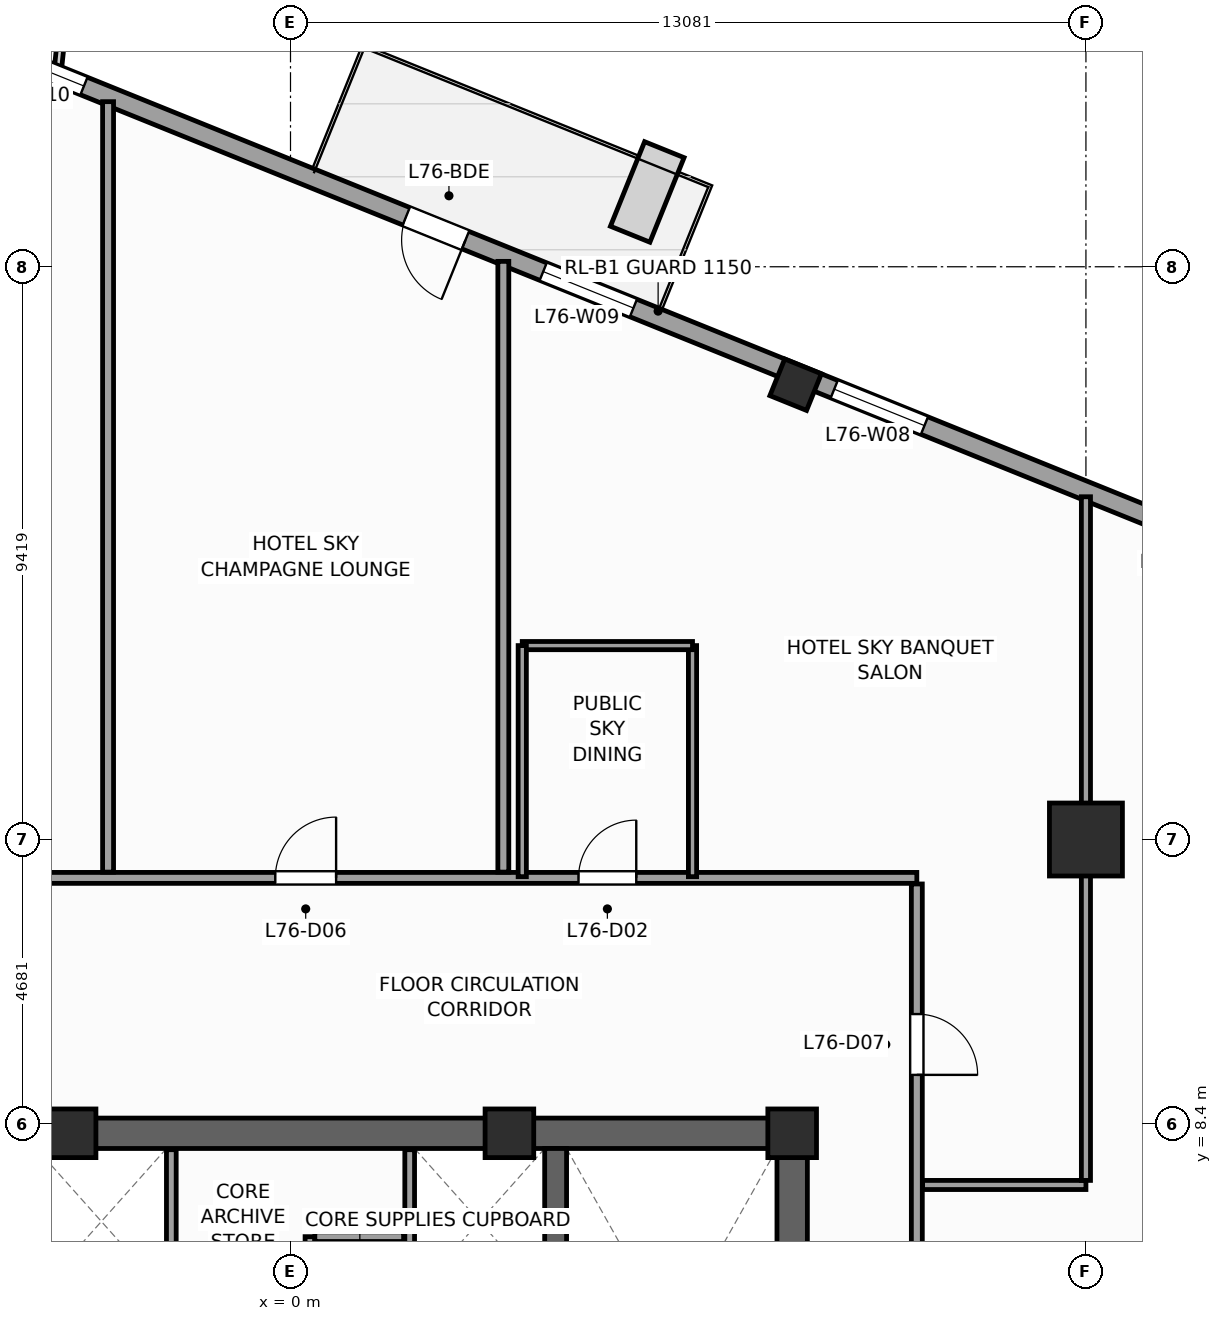
"""IFC4 building model, lengths in metres.
Left out: names, types, materials, properties, quantities, classifications, styles, units other than length and angle.
Written with IfcOpenShell. Run it as: python <this file> out.ifc"""

import sys

from ifc_helpers import new_model, si_unit, direction, frame, frame_2d, origin, origin_2d, place, context, subcontext, project, spatial, rectangle, extrude, source, transform, mapped, element, fill, save


model = new_model("IFC4")
c1 = context("Model", 3, precision=1e-05, world=origin(), true_north=direction((0.0, 1.0)))
c2 = subcontext(c1, "Body", "Model", "MODEL_VIEW")
j1 = project(units=[si_unit("LENGTHUNIT", "METRE"), si_unit("PLANEANGLEUNIT", "RADIAN")], contexts=[c1])
p1 = place(None, origin())
s1 = spatial("IfcSite", under=j1, at=p1, CompositionType="ELEMENT")
p2 = place(p1, origin())
s2 = spatial("IfcBuilding", under=s1, at=p2, CompositionType="ELEMENT")
p3 = place(p2, frame((0.0, 0.0, 308.4)))
s3 = spatial("IfcBuildingStorey", under=s2, at=p3, CompositionType="ELEMENT", Elevation=308.4)
p4 = place(p3, frame((-8.5, 8.25, 0.0), z_axis=(0.0, 0.0, 1.0), x_axis=(1.0, 0.0, 0.0)))
e1 = element("IfcWall", 1, at=p4, inside=s3, PredefinedType="SHEAR", context=c2, shape_type="SweptSolid", body=[
    extrude(rectangle(XDim=17.0, YDim=0.5, at=frame_2d((8.5, 0.0))), origin(), (0.0, 0.0, 1.0), 3.6),
])
p5 = place(p3, frame((8.25, -8.0, 0.0), z_axis=(0.0, 0.0, 1.0), x_axis=(0.0, 1.0, 0.0)))
e2 = element("IfcWall", 2, at=p5, inside=s3, PredefinedType="SHEAR", context=c2, shape_type="SweptSolid", body=[
    extrude(rectangle(XDim=16.0, YDim=0.5, at=frame_2d((8.0, 0.0))), origin(), (0.0, 0.0, 1.0), 3.6),
])
p6 = place(p5, frame((4.69, 0.0, 0.0)))
e3 = element("IfcOpeningElement", 3, at=p6, cuts=e2, PredefinedType="OPENING", context=c2, shape_type="SweptSolid", body=[
    extrude(rectangle(XDim=1.3, YDim=2.2, at=frame_2d((0.65, 1.1))), frame((0.0, 0.26, 0.0), z_axis=(0.0, -1.0, 0.0), x_axis=(1.0, 0.0, 0.0)), (0.0, 0.0, 1.0), 0.52),
])
p7 = place(p3, frame((4.36, -8.0, 0.0), z_axis=(0.0, 0.0, 1.0), x_axis=(0.0, 1.0, 0.0)))
e4 = element("IfcWall", 4, at=p7, inside=s3, PredefinedType="SHEAR", context=c2, shape_type="SweptSolid", body=[
    extrude(rectangle(XDim=16.0, YDim=0.36, at=frame_2d((8.0, 0.0))), origin(), (0.0, 0.0, 1.0), 3.6),
])
m1 = source(origin(), c2, "Body", "SweptSolid", [
    extrude(rectangle(XDim=0.8, YDim=0.8, at=origin_2d()), origin(), (0.0, 0.0, 1.0), 3.6),
])
for number, where, z_axis, x_axis in (
    (5, (8.25, 8.25, 0.0), (0.0, 0.0, 1.0), (1.0, 0.0, 0.0)),
    (6, (-3.6, 8.25, 0.0), (0.0, 0.0, 1.0), (1.0, 0.0, 0.0)),
    (7, (3.6, 8.25, 0.0), (0.0, 0.0, 1.0), (1.0, 0.0, 0.0)),
):
    element("IfcColumn", number, at=place(p3, frame(where, z_axis=z_axis, x_axis=x_axis)), inside=s3, PredefinedType="PILASTER", context=c2, shape_type="MappedRepresentation", body=[
        mapped(m1, transform((0.0, 0.0, 0.0), scale=1.0)),
    ])
m2 = source(origin(), c2, "Body", "SweptSolid", [
    extrude(rectangle(XDim=1.2, YDim=1.2, at=origin_2d()), origin(), (0.0, 0.0, 1.0), 3.6),
])
p8 = place(p3, frame((13.081, 13.081, 0.0), z_axis=(0.0, 0.0, 1.0), x_axis=(1.0, 0.0, 0.0)))
e8 = element("IfcColumn", 8, at=p8, inside=s3, PredefinedType="COLUMN", context=c2, shape_type="MappedRepresentation", body=[
    mapped(m2, transform((0.0, 0.0, 0.0), scale=1.0)),
])
m3 = source(origin(), c2, "Body", "SweptSolid", [
    extrude(rectangle(XDim=0.65, YDim=0.65, at=origin_2d()), origin(), (0.0, 0.0, 1.0), 3.6),
])
p9 = place(p3, frame((8.307, 20.56, 0.0), z_axis=(0.0, 0.0, 1.0), x_axis=(0.374606593416, 0.927183854567, 0.0)))
e9 = element("IfcColumn", 9, at=p9, inside=s3, PredefinedType="COLUMN", context=c2, shape_type="MappedRepresentation", body=[
    mapped(m3, transform((0.0, 0.0, 0.0), scale=1.0)),
])
p10 = place(p3, frame((23.813, 14.479, 0.0), z_axis=(0.0, 0.0, 1.0), x_axis=(-0.927182657188, 0.374609557019, 0.0)))
e10 = element("IfcWall", 10, at=p10, inside=s3, PredefinedType="STANDARD", context=c2, shape_type="SweptSolid", body=[
    extrude(rectangle(XDim=33.31, YDim=0.31, at=frame_2d((16.655, 0.0))), origin(), (0.0, 0.0, 1.0), 2.75),
])
p11 = place(p10, frame((22.58, 0.0, 0.0)))
e11 = element("IfcOpeningElement", 11, at=p11, cuts=e10, PredefinedType="OPENING", context=c2, shape_type="SweptSolid", body=[
    extrude(rectangle(XDim=1.05, YDim=2.25, at=frame_2d((0.525, 1.125))), frame((0.0, 0.165, 0.0), z_axis=(0.0, -1.0, 0.0), x_axis=(1.0, 0.0, 0.0)), (0.0, 0.0, 1.0), 0.33),
])
p12 = place(p10, frame((3.197, 0.0, 0.47)))
e12 = element("IfcOpeningElement", 12, at=p12, cuts=e10, PredefinedType="OPENING", context=c2, shape_type="SweptSolid", body=[
    extrude(rectangle(XDim=1.6, YDim=2.1, at=frame_2d((0.8, 1.05))), frame((0.0, 0.165, 0.0), z_axis=(0.0, -1.0, 0.0), x_axis=(1.0, 0.0, 0.0)), (0.0, 0.0, 1.0), 0.33),
])
p13 = place(p10, frame((8.86, 0.0, 0.47)))
e13 = element("IfcOpeningElement", 13, at=p13, cuts=e10, PredefinedType="OPENING", context=c2, shape_type="SweptSolid", body=[
    extrude(rectangle(XDim=1.6, YDim=2.1, at=frame_2d((0.8, 1.05))), frame((0.0, 0.165, 0.0), z_axis=(0.0, -1.0, 0.0), x_axis=(1.0, 0.0, 0.0)), (0.0, 0.0, 1.0), 0.33),
])
p14 = place(p10, frame((14.439, 0.0, 0.47)))
e14 = element("IfcOpeningElement", 14, at=p14, cuts=e10, PredefinedType="OPENING", context=c2, shape_type="SweptSolid", body=[
    extrude(rectangle(XDim=1.6, YDim=2.1, at=frame_2d((0.8, 1.05))), frame((0.0, 0.165, 0.0), z_axis=(0.0, -1.0, 0.0), x_axis=(1.0, 0.0, 0.0)), (0.0, 0.0, 1.0), 0.33),
])
p15 = place(p10, frame((19.601, 0.0, 0.47)))
e15 = element("IfcOpeningElement", 15, at=p15, cuts=e10, PredefinedType="OPENING", context=c2, shape_type="SweptSolid", body=[
    extrude(rectangle(XDim=1.6, YDim=2.1, at=frame_2d((0.8, 1.05))), frame((0.0, 0.165, 0.0), z_axis=(0.0, -1.0, 0.0), x_axis=(1.0, 0.0, 0.0)), (0.0, 0.0, 1.0), 0.33),
])
p16 = place(p10, frame((29.347, 0.0, 0.47)))
e16 = element("IfcOpeningElement", 16, at=p16, cuts=e10, PredefinedType="OPENING", context=c2, shape_type="SweptSolid", body=[
    extrude(rectangle(XDim=1.6, YDim=2.1, at=frame_2d((0.8, 1.05))), frame((0.0, 0.165, 0.0), z_axis=(0.0, -1.0, 0.0), x_axis=(1.0, 0.0, 0.0)), (0.0, 0.0, 1.0), 0.33),
])
for number, where, z_axis, x_axis in (
    (17, (-1.96, 4.58, 0.0), (0.0, 0.0, 1.0), (0.0, 1.0, 0.0)),
    (18, (1.96, 4.58, 0.0), (0.0, 0.0, 1.0), (0.0, 1.0, 0.0)),
):
    element("IfcWall", number, at=place(p3, frame(where, z_axis=z_axis, x_axis=x_axis)), inside=s3, PredefinedType="PARTITIONING", context=c2, shape_type="SweptSolid", body=[
        extrude(rectangle(XDim=3.4, YDim=0.16, at=frame_2d((1.7, 0.0))), origin(), (0.0, 0.0, 1.0), 3.35),
    ])
p17 = place(p3, frame((0.32, 4.6, 0.0), z_axis=(0.0, 0.0, 1.0), x_axis=(0.0, 1.0, 0.0)))
e19 = element("IfcWall", 19, at=p17, inside=s3, PredefinedType="PARTITIONING", context=c2, shape_type="SweptSolid", body=[
    extrude(rectangle(XDim=1.95, YDim=0.16, at=frame_2d((0.975, 0.0))), origin(), (0.0, 0.0, 1.0), 3.35),
])
p18 = place(p3, frame((0.4, 6.55, 0.0), z_axis=(0.0, 0.0, 1.0), x_axis=(1.0, 0.0, 0.0)))
e20 = element("IfcWall", 20, at=p18, inside=s3, PredefinedType="PARTITIONING", context=c2, shape_type="SweptSolid", body=[
    extrude(rectangle(XDim=1.46, YDim=0.16, at=frame_2d((0.73, 0.0))), origin(), (0.0, 0.0, 1.0), 3.35),
])
p19 = place(p3, frame((-10.3, 12.45, 0.0), z_axis=(0.0, 0.0, 1.0), x_axis=(1.0, 0.0, 0.0)))
e21 = element("IfcWall", 21, at=p19, inside=s3, PredefinedType="PARTITIONING", context=c2, shape_type="SweptSolid", body=[
    extrude(rectangle(XDim=20.6, YDim=0.18, at=frame_2d((10.3, 0.0))), origin(), (0.0, 0.0, 1.0), 3.35),
])
p20 = place(p19, frame((15.036, 0.0, 0.0)))
e22 = element("IfcOpeningElement", 22, at=p20, cuts=e21, PredefinedType="OPENING", context=c2, shape_type="SweptSolid", body=[
    extrude(rectangle(XDim=0.95, YDim=2.1, at=frame_2d((0.475, 1.05))), frame((0.0, 0.1, 0.0), z_axis=(0.0, -1.0, 0.0), x_axis=(1.0, 0.0, 0.0)), (0.0, 0.0, 1.0), 0.2),
])
p21 = place(p19, frame((3.314, 0.0, 0.0)))
e23 = element("IfcOpeningElement", 23, at=p21, cuts=e21, PredefinedType="OPENING", context=c2, shape_type="SweptSolid", body=[
    extrude(rectangle(XDim=1.0, YDim=2.15, at=frame_2d((0.5, 1.075))), frame((0.0, 0.1, 0.0), z_axis=(0.0, -1.0, 0.0), x_axis=(1.0, 0.0, 0.0)), (0.0, 0.0, 1.0), 0.2),
])
p22 = place(p19, frame((10.05, 0.0, 0.0)))
e24 = element("IfcOpeningElement", 24, at=p22, cuts=e21, PredefinedType="OPENING", context=c2, shape_type="SweptSolid", body=[
    extrude(rectangle(XDim=1.0, YDim=2.15, at=frame_2d((0.5, 1.075))), frame((0.0, 0.1, 0.0), z_axis=(0.0, -1.0, 0.0), x_axis=(1.0, 0.0, 0.0)), (0.0, 0.0, 1.0), 0.2),
])
p23 = place(p3, frame((10.3, -12.35, 0.0), z_axis=(0.0, 0.0, 1.0), x_axis=(0.0, 1.0, 0.0)))
e25 = element("IfcWall", 25, at=p23, inside=s3, PredefinedType="PARTITIONING", context=c2, shape_type="SweptSolid", body=[
    extrude(rectangle(XDim=24.7, YDim=0.18, at=frame_2d((12.35, 0.0))), origin(), (0.0, 0.0, 1.0), 3.35),
])
p24 = place(p23, frame((21.561, 0.0, 0.0)))
e26 = element("IfcOpeningElement", 26, at=p24, cuts=e25, PredefinedType="OPENING", context=c2, shape_type="SweptSolid", body=[
    extrude(rectangle(XDim=1.0, YDim=2.15, at=frame_2d((0.5, 1.075))), frame((0.0, 0.1, 0.0), z_axis=(0.0, -1.0, 0.0), x_axis=(1.0, 0.0, 0.0)), (0.0, 0.0, 1.0), 0.2),
])
p25 = place(p23, frame((16.8, 0.0, 0.0)))
e27 = element("IfcOpeningElement", 27, at=p25, cuts=e25, PredefinedType="OPENING", context=c2, shape_type="SweptSolid", body=[
    extrude(rectangle(XDim=1.0, YDim=2.15, at=frame_2d((0.5, 1.075))), frame((0.0, 0.1, 0.0), z_axis=(0.0, -1.0, 0.0), x_axis=(1.0, 0.0, 0.0)), (0.0, 0.0, 1.0), 0.2),
])
p26 = place(p23, frame((11.85, 0.0, 0.0)))
e28 = element("IfcOpeningElement", 28, at=p26, cuts=e25, PredefinedType="OPENING", context=c2, shape_type="SweptSolid", body=[
    extrude(rectangle(XDim=1.0, YDim=2.15, at=frame_2d((0.5, 1.075))), frame((0.0, 0.1, 0.0), z_axis=(0.0, -1.0, 0.0), x_axis=(1.0, 0.0, 0.0)), (0.0, 0.0, 1.0), 0.2),
])
p27 = place(p23, frame((6.9, 0.0, 0.0)))
e29 = element("IfcOpeningElement", 29, at=p27, cuts=e25, PredefinedType="OPENING", context=c2, shape_type="SweptSolid", body=[
    extrude(rectangle(XDim=1.0, YDim=2.15, at=frame_2d((0.5, 1.075))), frame((0.0, 0.1, 0.0), z_axis=(0.0, -1.0, 0.0), x_axis=(1.0, 0.0, 0.0)), (0.0, 0.0, 1.0), 0.2),
])
p28 = place(p3, frame((-3.0, 12.545, 0.0), z_axis=(0.0, 0.0, 1.0), x_axis=(0.0, 1.0, 0.0)))
e30 = element("IfcWall", 30, at=p28, inside=s3, PredefinedType="PARTITIONING", context=c2, shape_type="SweptSolid", body=[
    extrude(rectangle(XDim=12.67, YDim=0.18, at=frame_2d((6.335, 0.0))), origin(), (0.0, 0.0, 1.0), 3.35),
])
p29 = place(p3, frame((3.5, 12.545, 0.0), z_axis=(0.0, 0.0, 1.0), x_axis=(0.0, 1.0, 0.0)))
e31 = element("IfcWall", 31, at=p29, inside=s3, PredefinedType="PARTITIONING", context=c2, shape_type="SweptSolid", body=[
    extrude(rectangle(XDim=10.044, YDim=0.18, at=frame_2d((5.022, 0.0))), origin(), (0.0, 0.0, 1.0), 3.35),
])
p30 = place(p3, frame((10.395, 7.4, 0.0), z_axis=(0.0, 0.0, 1.0), x_axis=(1.0, 0.0, 0.0)))
e32 = element("IfcWall", 32, at=p30, inside=s3, PredefinedType="PARTITIONING", context=c2, shape_type="SweptSolid", body=[
    extrude(rectangle(XDim=2.686, YDim=0.15, at=frame_2d((1.343, 0.0))), origin(), (0.0, 0.0, 1.0), 3.35),
])
p31 = place(p3, frame((13.081, 7.475, 0.0), z_axis=(0.0, 0.0, 1.0), x_axis=(0.0, 1.0, 0.0)))
e33 = element("IfcWall", 33, at=p31, inside=s3, PredefinedType="PARTITIONING", context=c2, shape_type="SweptSolid", body=[
    extrude(rectangle(XDim=11.243, YDim=0.15, at=frame_2d((5.621, 0.0))), origin(), (0.0, 0.0, 1.0), 2.45),
])
p32 = place(p3, frame((6.611, 12.47, 0.0), z_axis=(0.0, 0.0, 1.0), x_axis=(0.0, 1.0, 0.0)))
e34 = element("IfcWall", 34, at=p32, inside=s3, PredefinedType="PARTITIONING", context=c2, shape_type="SweptSolid", body=[
    extrude(rectangle(XDim=3.8, YDim=0.135, at=frame_2d((1.9, 0.0))), origin(), (0.0, 0.0, 1.0), 3.35),
])
p33 = place(p3, frame((3.811, 16.27, 0.0), z_axis=(0.0, 0.0, 1.0), x_axis=(1.0, 0.0, 0.0)))
e35 = element("IfcWall", 35, at=p33, inside=s3, PredefinedType="PARTITIONING", context=c2, shape_type="SweptSolid", body=[
    extrude(rectangle(XDim=2.8, YDim=0.135, at=frame_2d((1.4, 0.0))), origin(), (0.0, 0.0, 1.0), 2.95),
])
p34 = place(p3, frame((3.811, 12.47, 0.0), z_axis=(0.0, 0.0, 1.0), x_axis=(0.0, 1.0, 0.0)))
e36 = element("IfcWall", 36, at=p34, inside=s3, PredefinedType="PARTITIONING", context=c2, shape_type="SweptSolid", body=[
    extrude(rectangle(XDim=3.8, YDim=0.135, at=frame_2d((1.9, 0.0))), origin(), (0.0, 0.0, 1.0), 3.35),
])
m4 = source(origin(), c2, "Body", "SweptSolid", [
    extrude(rectangle(XDim=1.05, YDim=2.25, at=frame_2d((0.525, 1.125))), frame((0.0, 0.025, 0.0), z_axis=(0.0, -1.0, 0.0), x_axis=(1.0, 0.0, 0.0)), (0.0, 0.0, 1.0), 0.05),
])
p35 = place(p11, origin())
e37 = element("IfcDoor", 37, at=p35, inside=s3, OperationType="SINGLE_SWING_LEFT", PredefinedType="DOOR", context=c2, shape_type="MappedRepresentation", body=[
    mapped(m4, transform((0.0, 0.0, 0.0), scale=1.0)),
])
fill(e11, e37)
m5 = source(origin(), c2, "Body", "SweptSolid", [
    extrude(rectangle(XDim=1.6, YDim=2.1, at=frame_2d((0.8, 1.05))), frame((0.0, 0.03, 0.0), z_axis=(0.0, -1.0, 0.0), x_axis=(1.0, 0.0, 0.0)), (0.0, 0.0, 1.0), 0.06),
])
p36 = place(p14, origin())
e38 = element("IfcWindow", 38, at=p36, inside=s3, PartitioningType="SINGLE_PANEL", PredefinedType="WINDOW", context=c2, shape_type="MappedRepresentation", body=[
    mapped(m5, transform((0.0, 0.0, 0.0), scale=1.0)),
])
fill(e14, e38)
p37 = place(p15, origin())
e39 = element("IfcWindow", 39, at=p37, inside=s3, PartitioningType="SINGLE_PANEL", PredefinedType="WINDOW", context=c2, shape_type="MappedRepresentation", body=[
    mapped(m5, transform((0.0, 0.0, 0.0), scale=1.0)),
])
fill(e15, e39)
p38 = place(p16, origin())
e40 = element("IfcWindow", 40, at=p38, inside=s3, PartitioningType="SINGLE_PANEL", PredefinedType="WINDOW", context=c2, shape_type="MappedRepresentation", body=[
    mapped(m5, transform((0.0, 0.0, 0.0), scale=1.0)),
])
fill(e16, e40)
m6 = source(origin(), c2, "Body", "SweptSolid", [
    extrude(rectangle(XDim=0.95, YDim=2.1, at=frame_2d((0.475, 1.05))), frame((0.0, 0.025, 0.0), z_axis=(0.0, -1.0, 0.0), x_axis=(1.0, 0.0, 0.0)), (0.0, 0.0, 1.0), 0.05),
])
p39 = place(p20, origin())
e41 = element("IfcDoor", 41, at=p39, inside=s3, OperationType="SINGLE_SWING_RIGHT", PredefinedType="DOOR", context=c2, shape_type="MappedRepresentation", body=[
    mapped(m6, transform((0.0, 0.0, 0.0), scale=1.0)),
])
fill(e22, e41)
m7 = source(origin(), c2, "Body", "SweptSolid", [
    extrude(rectangle(XDim=1.0, YDim=2.15, at=frame_2d((0.5, 1.075))), frame((0.0, 0.025, 0.0), z_axis=(0.0, -1.0, 0.0), x_axis=(1.0, 0.0, 0.0)), (0.0, 0.0, 1.0), 0.05),
])
p40 = place(p22, origin())
e42 = element("IfcDoor", 42, at=p40, inside=s3, OperationType="SINGLE_SWING_RIGHT", PredefinedType="DOOR", context=c2, shape_type="MappedRepresentation", body=[
    mapped(m7, transform((0.0, 0.0, 0.0), scale=1.0)),
])
fill(e24, e42)
p41 = place(p24, frame((1.0, 0.0, 0.0), z_axis=(0.0, 0.0, 1.0), x_axis=(-1.0, 0.0, 0.0)))
e43 = element("IfcDoor", 43, at=p41, inside=s3, OperationType="SINGLE_SWING_LEFT", PredefinedType="DOOR", context=c2, shape_type="MappedRepresentation", body=[
    mapped(m7, transform((0.0, 0.0, 0.0), scale=1.0)),
])
fill(e26, e43)
save(model, sys.argv[1])
